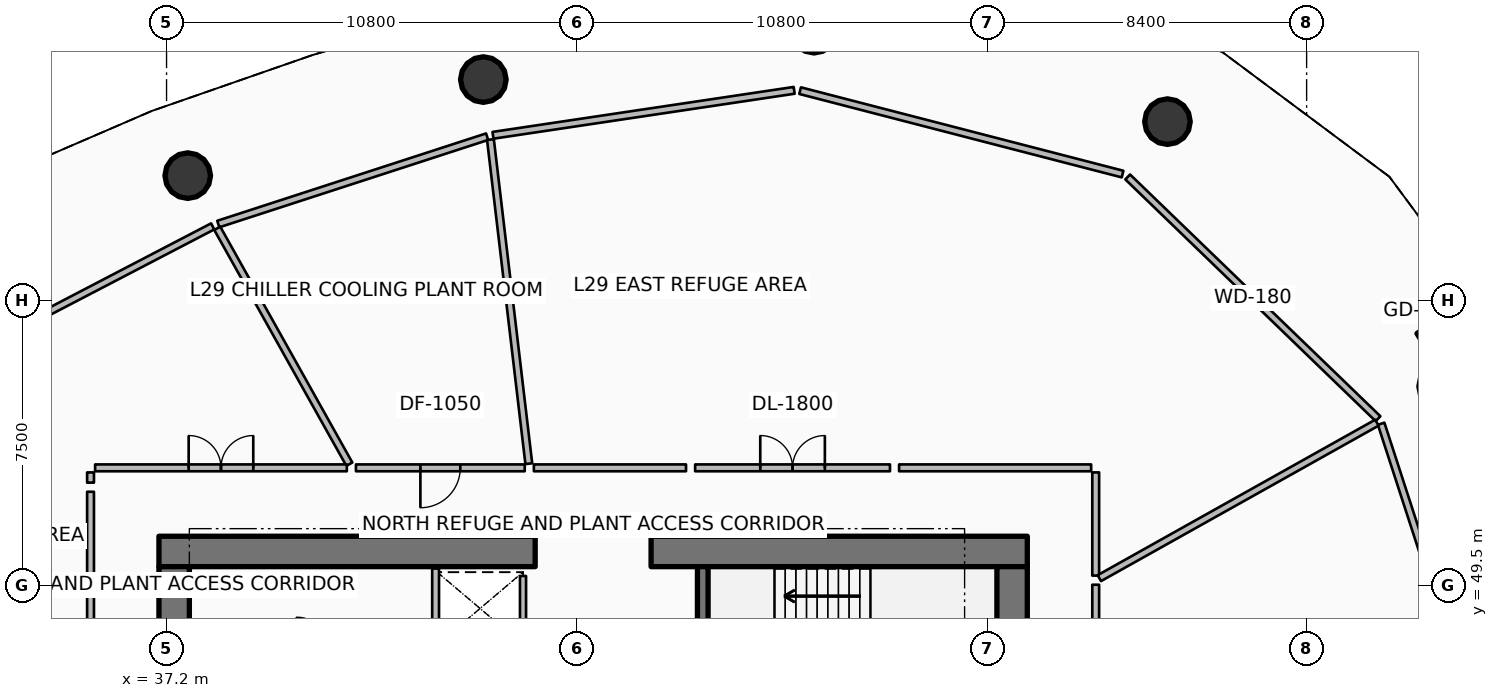
"""IFC4 building model, lengths in metres.
Left out: names, types, materials, properties, quantities, classifications, styles, units other than length and angle.
Written with IfcOpenShell. Run it as: python <this file> out.ifc"""

import sys

from ifc_helpers import new_model, si_unit, direction, frame, frame_2d, origin, origin_2d, place, context, subcontext, project, spatial, rectangle, circle, extrude, element, fill, save


model = new_model("IFC4")
c1 = context("Model", 3, precision=1e-05, world=origin(), true_north=direction((0.0, 1.0)))
c2 = subcontext(c1, "Body", "Model", "MODEL_VIEW")
j1 = project(units=[si_unit("LENGTHUNIT", "METRE"), si_unit("PLANEANGLEUNIT", "RADIAN")], contexts=[c1])
p1 = place(None, origin())
s1 = spatial("IfcSite", under=j1, at=p1, CompositionType="ELEMENT")
p2 = place(p1, origin())
s2 = spatial("IfcBuilding", under=s1, at=p2, CompositionType="ELEMENT")
p3 = place(p2, frame((0.0, 0.0, 116.4)))
s3 = spatial("IfcBuildingStorey", under=s2, at=p3, CompositionType="ELEMENT", Elevation=116.4)
p4 = place(p3, frame((37.0, 50.4, 0.0), z_axis=(0.0, 0.0, 1.0), x_axis=(1.0, 0.0, 0.0)))
e1 = element("IfcWall", 1, at=p4, inside=s3, PredefinedType="SHEAR", context=c2, shape_type="SweptSolid", body=[
    extrude(rectangle(XDim=9.9, YDim=0.8, at=frame_2d((4.95, 0.0))), origin(), (0.0, 0.0, 1.0), 6.6),
])
p5 = place(p3, frame((49.95, 50.4, 0.0), z_axis=(0.0, 0.0, 1.0), x_axis=(1.0, 0.0, 0.0)))
e2 = element("IfcWall", 2, at=p5, inside=s3, PredefinedType="SHEAR", context=c2, shape_type="SweptSolid", body=[
    extrude(rectangle(XDim=9.9, YDim=0.8, at=frame_2d((4.95, 0.0))), origin(), (0.0, 0.0, 1.0), 6.6),
])
for number, where, z_axis, x_axis in (
    (3, (37.4, 34.0, 0.0), (0.0, 0.0, 1.0), (0.0, 1.0, 0.0)),
    (4, (59.45, 34.0, 0.0), (0.0, 0.0, 1.0), (0.0, 1.0, 0.0)),
):
    element("IfcWall", number, at=place(p3, frame(where, z_axis=z_axis, x_axis=x_axis)), inside=s3, PredefinedType="SHEAR", context=c2, shape_type="SweptSolid", body=[
        extrude(rectangle(XDim=16.0, YDim=0.8, at=frame_2d((8.0, 0.0))), origin(), (0.0, 0.0, 1.0), 6.6),
    ])
p6 = place(p3, frame((51.31, 46.5, 0.0), z_axis=(0.0, 0.0, 1.0), x_axis=(0.0, 1.0, 0.0)))
e5 = element("IfcWall", 5, at=p6, inside=s3, PredefinedType="SHEAR", context=c2, shape_type="SweptSolid", body=[
    extrude(rectangle(XDim=3.5, YDim=0.28, at=frame_2d((1.75, 0.0))), origin(), (0.0, 0.0, 1.0), 6.6),
])
p7 = place(p3, frame((70.249, 55.903, 0.0), z_axis=(0.0, 0.0, 1.0), x_axis=(0.848033572426, 0.529942506352, 0.0)))
e6 = element("IfcWall", 6, at=p7, inside=s3, PredefinedType="SOLIDWALL", context=c2, shape_type="SweptSolid", body=[
    extrude(rectangle(XDim=3.5, YDim=0.55, at=frame_2d((1.75, 0.0))), origin(), (0.0, 0.0, 1.0), 6.6),
])
for number, where, z_axis, x_axis in (
    (7, (63.538, 61.71, 0.0), (0.0, 0.0, 1.0), (1.0, 0.0, 0.0)),
    (8, (54.237, 64.116, 0.0), (0.0, 0.0, 1.0), (1.0, 0.0, 0.0)),
    (9, (45.536, 62.817, 0.0), (0.0, 0.0, 1.0), (1.0, 0.0, 0.0)),
    (10, (37.758, 60.289, 0.0), (0.0, 0.0, 1.0), (1.0, 0.0, 0.0)),
):
    element("IfcColumn", number, at=place(p3, frame(where, z_axis=z_axis, x_axis=x_axis)), inside=s3, PredefinedType="COLUMN", context=c2, shape_type="SweptSolid", body=[
        extrude(circle(Radius=0.6, at=origin_2d()), origin(), (0.0, 0.0, 1.0), 6.28),
    ])
p8 = place(p3, frame((46.58, 48.045, 0.0), z_axis=(0.0, 0.0, 1.0), x_axis=(0.0, 1.0, 0.0)))
e11 = element("IfcWall", 11, at=p8, inside=s3, PredefinedType="PARTITIONING", context=c2, shape_type="SweptSolid", body=[
    extrude(rectangle(XDim=1.71, YDim=0.16, at=frame_2d((0.855, 0.0))), origin(), (0.0, 0.0, 1.0), 6.28),
])
p9 = place(p3, frame((44.28, 47.82, 0.0), z_axis=(0.0, 0.0, 1.0), x_axis=(0.0, 1.0, 0.0)))
e12 = element("IfcWall", 12, at=p9, inside=s3, PredefinedType="PARTITIONING", context=c2, shape_type="SweptSolid", body=[
    extrude(rectangle(XDim=2.13, YDim=0.18, at=frame_2d((1.065, 0.0))), origin(), (0.0, 0.0, 1.0), 6.28),
])
p10 = place(p3, frame((69.079, 53.893, 0.0), z_axis=(0.0, 0.0, 1.0), x_axis=(-0.719342658177, 0.694655411069, 0.0)))
e13 = element("IfcWall", 13, at=p10, inside=s3, PredefinedType="PARTITIONING", context=c2, shape_type="SweptSolid", body=[
    extrude(rectangle(XDim=9.157, YDim=0.18, at=frame_2d((4.579, 0.0))), origin(), (0.0, 0.0, 1.0), 2.304),
])
p11 = place(p3, frame((62.357, 60.33, 0.0), z_axis=(0.0, 0.0, 1.0), x_axis=(-0.968122342154, 0.250477804651, 0.0)))
e14 = element("IfcWall", 14, at=p11, inside=s3, PredefinedType="PARTITIONING", context=c2, shape_type="SweptSolid", body=[
    extrude(rectangle(XDim=8.764, YDim=0.18, at=frame_2d((4.382, 0.0))), origin(), (0.0, 0.0, 1.0), 2.304),
])
p12 = place(p3, frame((53.715, 62.533, 0.0), z_axis=(0.0, 0.0, 1.0), x_axis=(-0.989034471801, -0.147684845497, 0.0)))
e15 = element("IfcWall", 15, at=p12, inside=s3, PredefinedType="PARTITIONING", context=c2, shape_type="SweptSolid", body=[
    extrude(rectangle(XDim=8.013, YDim=0.18, at=frame_2d((4.006, 0.0))), origin(), (0.0, 0.0, 1.0), 2.304),
])
p13 = place(p3, frame((45.635, 61.313, 0.0), z_axis=(0.0, 0.0, 1.0), x_axis=(-0.951058670218, -0.309010365204, 0.0)))
e16 = element("IfcWall", 16, at=p13, inside=s3, PredefinedType="PARTITIONING", context=c2, shape_type="SweptSolid", body=[
    extrude(rectangle(XDim=7.438, YDim=0.18, at=frame_2d((3.719, 0.0))), origin(), (0.0, 0.0, 1.0), 5.273),
])
p14 = place(p3, frame((38.414, 58.953, 0.0), z_axis=(0.0, 0.0, 1.0), x_axis=(-0.886950751462, -0.46186401081, 0.0)))
e17 = element("IfcWall", 17, at=p14, inside=s3, PredefinedType="PARTITIONING", context=c2, shape_type="SweptSolid", body=[
    extrude(rectangle(XDim=8.012, YDim=0.18, at=frame_2d((4.006, 0.0))), origin(), (0.0, 0.0, 1.0), 2.304),
])
p15 = place(p3, frame((72.033, 44.924, 0.0), z_axis=(0.0, 0.0, 1.0), x_axis=(-0.309006462603, 0.951059938211, 0.0)))
e18 = element("IfcWall", 18, at=p15, inside=s3, PredefinedType="PARTITIONING", context=c2, shape_type="SweptSolid", body=[
    extrude(rectangle(XDim=9.292, YDim=0.18, at=frame_2d((4.646, 0.0))), origin(), (0.0, 0.0, 1.0), 5.273),
])
p16 = place(p3, frame((61.65, 49.764, 0.0), z_axis=(0.0, 0.0, 1.0), x_axis=(0.0, 1.0, 0.0)))
e19 = element("IfcWall", 19, at=p16, inside=s3, PredefinedType="PARTITIONING", context=c2, shape_type="SweptSolid", body=[
    extrude(rectangle(XDim=2.716, YDim=0.18, at=frame_2d((1.358, 0.0))), origin(), (0.0, 0.0, 1.0), 5.273),
])
p17 = place(p3, frame((61.53, 52.6, 0.0), z_axis=(0.0, 0.0, 1.0), x_axis=(-1.0, 0.0, 0.0)))
e20 = element("IfcWall", 20, at=p17, inside=s3, PredefinedType="PARTITIONING", context=c2, shape_type="SweptSolid", body=[
    extrude(rectangle(XDim=5.054, YDim=0.18, at=frame_2d((2.527, 0.0))), origin(), (0.0, 0.0, 1.0), 2.304),
])
p18 = place(p3, frame((56.236, 52.6, 0.0), z_axis=(0.0, 0.0, 1.0), x_axis=(-1.0, 0.0, 0.0)))
e21 = element("IfcWall", 21, at=p18, inside=s3, PredefinedType="PARTITIONING", context=c2, shape_type="SweptSolid", body=[
    extrude(rectangle(XDim=5.127, YDim=0.18, at=frame_2d((2.563, 0.0))), origin(), (0.0, 0.0, 1.0), 2.304),
])
p19 = place(p18, frame((1.713, 0.0, 0.0)))
e22 = element("IfcOpeningElement", 22, at=p19, cuts=e21, PredefinedType="OPENING", context=c2, shape_type="SweptSolid", body=[
    extrude(rectangle(XDim=1.7, YDim=2.15, at=frame_2d((0.85, 1.075))), frame((0.0, 0.1, 0.0), z_axis=(0.0, -1.0, 0.0), x_axis=(1.0, 0.0, 0.0)), (0.0, 0.0, 1.0), 0.2),
])
p20 = place(p3, frame((50.869, 52.6, 0.0), z_axis=(0.0, 0.0, 1.0), x_axis=(-1.0, 0.0, 0.0)))
e23 = element("IfcWall", 23, at=p20, inside=s3, PredefinedType="PARTITIONING", context=c2, shape_type="SweptSolid", body=[
    extrude(rectangle(XDim=4.004, YDim=0.18, at=frame_2d((2.002, 0.0))), origin(), (0.0, 0.0, 1.0), 2.304),
])
p21 = place(p3, frame((61.746, 49.698, 0.0), z_axis=(0.0, 0.0, 1.0), x_axis=(0.872491592103, 0.488629124908, 0.0)))
e24 = element("IfcWall", 24, at=p21, inside=s3, PredefinedType="PARTITIONING", context=c2, shape_type="SweptSolid", body=[
    extrude(rectangle(XDim=8.371, YDim=0.18, at=frame_2d((4.185, 0.0))), origin(), (0.0, 0.0, 1.0), 5.273),
])
p22 = place(p3, frame((46.732, 52.709, 0.0), z_axis=(0.0, 0.0, 1.0), x_axis=(-0.117538852682, 0.993068284717, 0.0)))
e25 = element("IfcWall", 25, at=p22, inside=s3, PredefinedType="PARTITIONING", context=c2, shape_type="SweptSolid", body=[
    extrude(rectangle(XDim=8.589, YDim=0.18, at=frame_2d((4.294, 0.0))), origin(), (0.0, 0.0, 1.0), 5.273),
])
p23 = place(p3, frame((46.625, 52.6, 0.0), z_axis=(0.0, 0.0, 1.0), x_axis=(-1.0, 0.0, 0.0)))
e26 = element("IfcWall", 26, at=p23, inside=s3, PredefinedType="PARTITIONING", context=c2, shape_type="SweptSolid", body=[
    extrude(rectangle(XDim=4.442, YDim=0.18, at=frame_2d((2.221, 0.0))), origin(), (0.0, 0.0, 1.0), 5.273),
])
p24 = place(p23, frame((1.696, 0.0, 0.0)))
e27 = element("IfcOpeningElement", 27, at=p24, cuts=e26, PredefinedType="OPENING", context=c2, shape_type="SweptSolid", body=[
    extrude(rectangle(XDim=1.05, YDim=2.1, at=frame_2d((0.525, 1.05))), frame((0.0, 0.1, 0.0), z_axis=(0.0, -1.0, 0.0), x_axis=(1.0, 0.0, 0.0)), (0.0, 0.0, 1.0), 0.2),
])
p25 = place(p3, frame((42.01, 52.696, 0.0), z_axis=(0.0, 0.0, 1.0), x_axis=(-0.488621135235, 0.872496066583, 0.0)))
e28 = element("IfcWall", 28, at=p25, inside=s3, PredefinedType="PARTITIONING", context=c2, shape_type="SweptSolid", body=[
    extrude(rectangle(XDim=7.114, YDim=0.18, at=frame_2d((3.557, 0.0))), origin(), (0.0, 0.0, 1.0), 5.273),
])
p26 = place(p3, frame((41.944, 52.6, 0.0), z_axis=(0.0, 0.0, 1.0), x_axis=(-1.0, 0.0, 0.0)))
e29 = element("IfcWall", 29, at=p26, inside=s3, PredefinedType="PARTITIONING", context=c2, shape_type="SweptSolid", body=[
    extrude(rectangle(XDim=6.624, YDim=0.18, at=frame_2d((3.312, 0.0))), origin(), (0.0, 0.0, 1.0), 5.273),
])
p27 = place(p26, frame((2.462, 0.0, 0.0)))
e30 = element("IfcOpeningElement", 30, at=p27, cuts=e29, PredefinedType="OPENING", context=c2, shape_type="SweptSolid", body=[
    extrude(rectangle(XDim=1.7, YDim=2.15, at=frame_2d((0.85, 1.075))), frame((0.0, 0.1, 0.0), z_axis=(0.0, -1.0, 0.0), x_axis=(1.0, 0.0, 0.0)), (0.0, 0.0, 1.0), 0.2),
])
p28 = place(p3, frame((35.2, 52.48, 0.0), z_axis=(0.0, 0.0, 1.0), x_axis=(0.0, -1.0, 0.0)))
e31 = element("IfcWall", 31, at=p28, inside=s3, PredefinedType="PARTITIONING", context=c2, shape_type="SweptSolid", body=[
    extrude(rectangle(XDim=0.269, YDim=0.18, at=frame_2d((0.135, 0.0))), origin(), (0.0, 0.0, 1.0), 2.304),
])
p29 = place(p3, frame((35.2, 51.971, 0.0), z_axis=(0.0, 0.0, 1.0), x_axis=(0.0, -1.0, 0.0)))
e32 = element("IfcWall", 32, at=p29, inside=s3, PredefinedType="PARTITIONING", context=c2, shape_type="SweptSolid", body=[
    extrude(rectangle(XDim=6.241, YDim=0.18, at=frame_2d((3.12, 0.0))), origin(), (0.0, 0.0, 1.0), 2.304),
])
p30 = place(p3, frame((61.65, 43.736, 0.0), z_axis=(0.0, 0.0, 1.0), x_axis=(0.0, 1.0, 0.0)))
e33 = element("IfcWall", 33, at=p30, inside=s3, PredefinedType="PARTITIONING", context=c2, shape_type="SweptSolid", body=[
    extrude(rectangle(XDim=5.789, YDim=0.18, at=frame_2d((2.895, 0.0))), origin(), (0.0, 0.0, 1.0), 5.273),
])
p31 = place(p30, frame((2.469, 0.0, 0.0)))
e34 = element("IfcOpeningElement", 34, at=p31, cuts=e33, PredefinedType="OPENING", context=c2, shape_type="SweptSolid", body=[
    extrude(rectangle(XDim=0.85, YDim=2.06, at=frame_2d((0.425, 1.03))), frame((0.0, 0.1, 0.0), z_axis=(0.0, -1.0, 0.0), x_axis=(1.0, 0.0, 0.0)), (0.0, 0.0, 1.0), 0.2),
])
p32 = place(p19, origin())
e35 = element("IfcDoor", 35, at=p32, inside=s3, OperationType="DOUBLE_DOOR_SINGLE_SWING", PredefinedType="DOOR", context=c2, shape_type="SweptSolid", body=[
    extrude(rectangle(XDim=1.7, YDim=2.15, at=frame_2d((0.85, 1.075))), frame((0.0, 0.025, 0.0), z_axis=(0.0, -1.0, 0.0), x_axis=(1.0, 0.0, 0.0)), (0.0, 0.0, 1.0), 0.05),
])
fill(e22, e35)
p33 = place(p24, origin())
e36 = element("IfcDoor", 36, at=p33, inside=s3, OperationType="SINGLE_SWING_RIGHT", PredefinedType="DOOR", context=c2, shape_type="SweptSolid", body=[
    extrude(rectangle(XDim=1.05, YDim=2.1, at=frame_2d((0.525, 1.05))), frame((0.0, 0.025, 0.0), z_axis=(0.0, -1.0, 0.0), x_axis=(1.0, 0.0, 0.0)), (0.0, 0.0, 1.0), 0.05),
])
fill(e27, e36)
p34 = place(p27, origin())
e37 = element("IfcDoor", 37, at=p34, inside=s3, OperationType="DOUBLE_DOOR_SINGLE_SWING", PredefinedType="DOOR", context=c2, shape_type="SweptSolid", body=[
    extrude(rectangle(XDim=1.7, YDim=2.15, at=frame_2d((0.85, 1.075))), frame((0.0, 0.025, 0.0), z_axis=(0.0, -1.0, 0.0), x_axis=(1.0, 0.0, 0.0)), (0.0, 0.0, 1.0), 0.05),
])
fill(e30, e37)
save(model, sys.argv[1])
